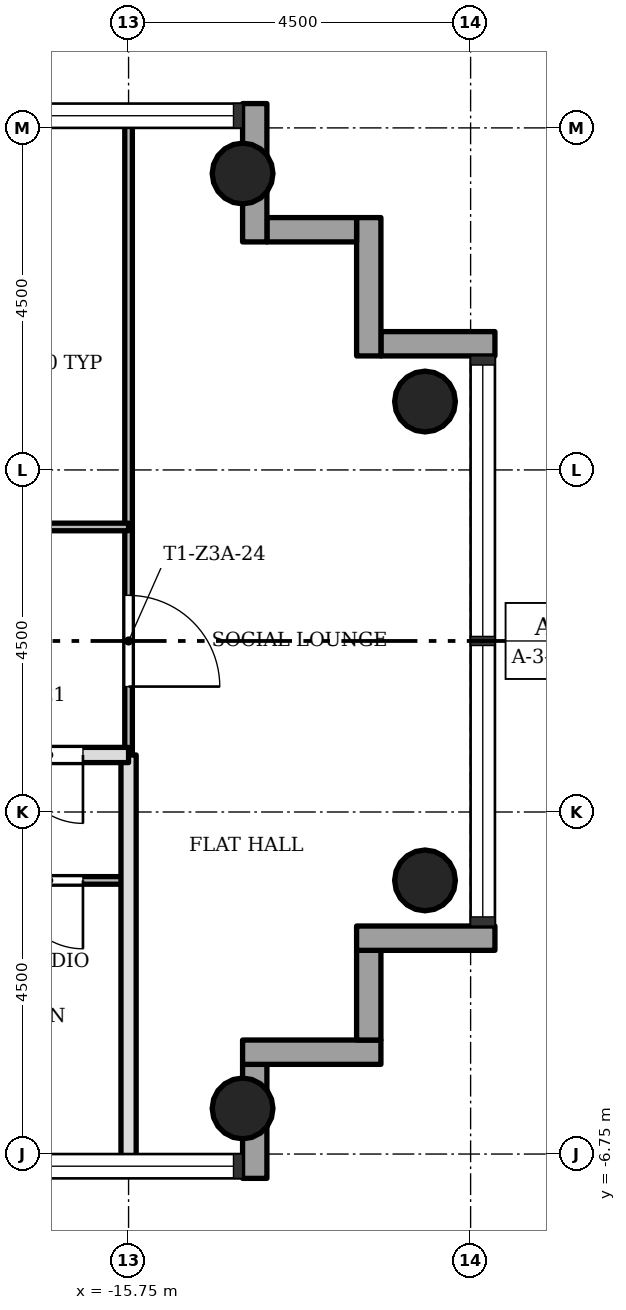
"""IFC4 building model, lengths in metres.
Left out: names, types, materials, properties, quantities, classifications, styles, units other than length and angle.
Written with IfcOpenShell. Run it as: python <this file> out.ifc"""

import sys

from ifc_helpers import new_model, si_unit, direction, frame, frame_2d, origin, origin_2d, place, context, subcontext, project, spatial, rectangle, hollow_circle, extrude, element, fill, save


model = new_model("IFC4")
c1 = context("Model", 3, precision=1e-05, world=origin(), true_north=direction((0.0, 1.0)))
c2 = subcontext(c1, "Body", "Model", "MODEL_VIEW")
j1 = project(units=[si_unit("LENGTHUNIT", "METRE"), si_unit("PLANEANGLEUNIT", "RADIAN")], contexts=[c1])
p1 = place(None, origin())
s1 = spatial("IfcSite", under=j1, at=p1, CompositionType="ELEMENT")
p2 = place(p1, origin())
s2 = spatial("IfcBuilding", under=s1, at=p2, CompositionType="ELEMENT")
p3 = place(p2, frame((0.0, 0.0, 140.5)))
s3 = spatial("IfcBuildingStorey", under=s2, at=p3, CompositionType="ELEMENT", Elevation=140.5)
for number, where, z_axis, x_axis in (
    (1, (-14.25, -6.15, 0.0), (0.0, 0.0, 1.0), (1.0, 0.0, 0.0)),
    (2, (-14.25, 6.15, 0.0), (0.0, 0.0, 1.0), (1.0, 0.0, 0.0)),
    (3, (-11.85, -3.15, 0.0), (0.0, 0.0, 1.0), (1.0, 0.0, 0.0)),
    (4, (-11.85, 3.15, 0.0), (0.0, 0.0, 1.0), (1.0, 0.0, 0.0)),
):
    element("IfcColumn", number, at=place(p3, frame(where, z_axis=z_axis, x_axis=x_axis)), inside=s3, PredefinedType="COLUMN", context=c2, shape_type="SweptSolid", body=[
        extrude(hollow_circle(Radius=0.4, WallThickness=0.028, at=origin_2d()), origin(), (0.0, 0.0, 1.0), 3.4),
    ])
p4 = place(p3, frame((-14.09, -7.07, -0.3), z_axis=(0.0, 0.0, 1.0), x_axis=(0.0, 1.0, 0.0)))
e5 = element("IfcWall", 5, at=p4, inside=s3, PredefinedType="STANDARD", context=c2, shape_type="SweptSolid", body=[
    extrude(rectangle(XDim=1.5, YDim=0.32, at=frame_2d((0.75, 0.0))), origin(), (0.0, 0.0, 1.0), 3.4),
])
p5 = place(p3, frame((-14.25, -5.41, -0.3), z_axis=(0.0, 0.0, 1.0), x_axis=(1.0, 0.0, 0.0)))
e6 = element("IfcWall", 6, at=p5, inside=s3, PredefinedType="STANDARD", context=c2, shape_type="SweptSolid", body=[
    extrude(rectangle(XDim=1.82, YDim=0.32, at=frame_2d((0.91, 0.0))), origin(), (0.0, 0.0, 1.0), 3.4),
])
p6 = place(p3, frame((-12.59, -5.25, -0.3), z_axis=(0.0, 0.0, 1.0), x_axis=(0.0, 1.0, 0.0)))
e7 = element("IfcWall", 7, at=p6, inside=s3, PredefinedType="STANDARD", context=c2, shape_type="SweptSolid", body=[
    extrude(rectangle(XDim=1.18, YDim=0.32, at=frame_2d((0.59, 0.0))), origin(), (0.0, 0.0, 1.0), 3.4),
])
p7 = place(p3, frame((-12.75, -3.91, -0.3), z_axis=(0.0, 0.0, 1.0), x_axis=(1.0, 0.0, 0.0)))
e8 = element("IfcWall", 8, at=p7, inside=s3, PredefinedType="STANDARD", context=c2, shape_type="SweptSolid", body=[
    extrude(rectangle(XDim=1.82, YDim=0.32, at=frame_2d((0.91, 0.0))), origin(), (0.0, 0.0, 1.0), 3.4),
])
p8 = place(p3, frame((-10.93, 3.91, -0.3), z_axis=(0.0, 0.0, 1.0), x_axis=(-1.0, 0.0, 0.0)))
e9 = element("IfcWall", 9, at=p8, inside=s3, PredefinedType="STANDARD", context=c2, shape_type="SweptSolid", body=[
    extrude(rectangle(XDim=1.5, YDim=0.32, at=frame_2d((0.75, 0.0))), origin(), (0.0, 0.0, 1.0), 3.4),
])
p9 = place(p3, frame((-12.59, 3.75, -0.3), z_axis=(0.0, 0.0, 1.0), x_axis=(0.0, 1.0, 0.0)))
e10 = element("IfcWall", 10, at=p9, inside=s3, PredefinedType="STANDARD", context=c2, shape_type="SweptSolid", body=[
    extrude(rectangle(XDim=1.82, YDim=0.32, at=frame_2d((0.91, 0.0))), origin(), (0.0, 0.0, 1.0), 3.4),
])
p10 = place(p3, frame((-12.75, 5.41, -0.3), z_axis=(0.0, 0.0, 1.0), x_axis=(-1.0, 0.0, 0.0)))
e11 = element("IfcWall", 11, at=p10, inside=s3, PredefinedType="STANDARD", context=c2, shape_type="SweptSolid", body=[
    extrude(rectangle(XDim=1.18, YDim=0.32, at=frame_2d((0.59, 0.0))), origin(), (0.0, 0.0, 1.0), 3.4),
])
p11 = place(p3, frame((-14.09, 5.25, -0.3), z_axis=(0.0, 0.0, 1.0), x_axis=(0.0, 1.0, 0.0)))
e12 = element("IfcWall", 12, at=p11, inside=s3, PredefinedType="STANDARD", context=c2, shape_type="SweptSolid", body=[
    extrude(rectangle(XDim=1.82, YDim=0.32, at=frame_2d((0.91, 0.0))), origin(), (0.0, 0.0, 1.0), 3.4),
])
p12 = place(p3, frame((-15.75, -1.5, 0.0), z_axis=(0.0, 0.0, 1.0), x_axis=(0.0, 1.0, 0.0)))
e13 = element("IfcWall", 13, at=p12, inside=s3, PredefinedType="PARTITIONING", context=c2, shape_type="SweptSolid", body=[
    extrude(rectangle(XDim=8.35, YDim=0.1, at=frame_2d((4.175, 0.0))), origin(), (0.0, 0.0, 1.0), 3.0),
])
p13 = place(p12, frame((0.9, 0.0, 0.0)))
e14 = element("IfcOpeningElement", 14, at=p13, cuts=e13, PredefinedType="OPENING", context=c2, shape_type="SweptSolid", body=[
    extrude(rectangle(XDim=1.2, YDim=2.1, at=frame_2d((0.6, 1.05))), frame((0.0, 0.06, 0.0), z_axis=(0.0, -1.0, 0.0), x_axis=(1.0, 0.0, 0.0)), (0.0, 0.0, 1.0), 0.12),
])
p14 = place(p3, frame((-15.75, -6.85, 0.0), z_axis=(0.0, 0.0, 1.0), x_axis=(0.0, 1.0, 0.0)))
e15 = element("IfcWall", 15, at=p14, inside=s3, PredefinedType="SOLIDWALL", context=c2, shape_type="SweptSolid", body=[
    extrude(rectangle(XDim=5.35, YDim=0.2, at=frame_2d((2.675, 0.0))), origin(), (0.0, 0.0, 1.0), 3.0),
])
p15 = place(p3, frame((-20.25, -3.15, 0.0), z_axis=(0.0, 0.0, 1.0), x_axis=(1.0, 0.0, 0.0)))
e16 = element("IfcWall", 16, at=p15, inside=s3, PredefinedType="PARTITIONING", context=c2, shape_type="SweptSolid", body=[
    extrude(rectangle(XDim=4.5, YDim=0.1, at=frame_2d((2.25, 0.0))), origin(), (0.0, 0.0, 1.0), 3.0),
])
p16 = place(p15, frame((3.0, 0.0, 0.0)))
e17 = element("IfcOpeningElement", 17, at=p16, cuts=e16, PredefinedType="OPENING", context=c2, shape_type="SweptSolid", body=[
    extrude(rectangle(XDim=0.9, YDim=2.1, at=frame_2d((0.45, 1.05))), frame((0.0, 0.06, 0.0), z_axis=(0.0, -1.0, 0.0), x_axis=(1.0, 0.0, 0.0)), (0.0, 0.0, 1.0), 0.12),
])
p17 = place(p3, frame((-20.25, -1.5, 0.0), z_axis=(0.0, 0.0, 1.0), x_axis=(1.0, 0.0, 0.0)))
e18 = element("IfcWall", 18, at=p17, inside=s3, PredefinedType="SOLIDWALL", context=c2, shape_type="SweptSolid", body=[
    extrude(rectangle(XDim=4.5, YDim=0.2, at=frame_2d((2.25, 0.0))), origin(), (0.0, 0.0, 1.0), 3.0),
])
p18 = place(p17, frame((3.0, 0.0, 0.0)))
e19 = element("IfcOpeningElement", 19, at=p18, cuts=e18, PredefinedType="OPENING", context=c2, shape_type="SweptSolid", body=[
    extrude(rectangle(XDim=0.9, YDim=2.1, at=frame_2d((0.45, 1.05))), frame((0.0, 0.11, 0.0), z_axis=(0.0, -1.0, 0.0), x_axis=(1.0, 0.0, 0.0)), (0.0, 0.0, 1.0), 0.22),
])
p19 = place(p3, frame((-20.25, 1.5, 0.0), z_axis=(0.0, 0.0, 1.0), x_axis=(1.0, 0.0, 0.0)))
e20 = element("IfcWall", 20, at=p19, inside=s3, PredefinedType="PARTITIONING", context=c2, shape_type="SweptSolid", body=[
    extrude(rectangle(XDim=4.5, YDim=0.1, at=frame_2d((2.25, 0.0))), origin(), (0.0, 0.0, 1.0), 3.0),
])
p20 = place(p19, frame((1.8, 0.0, 0.0)))
e21 = element("IfcOpeningElement", 21, at=p20, cuts=e20, PredefinedType="OPENING", context=c2, shape_type="SweptSolid", body=[
    extrude(rectangle(XDim=0.9, YDim=2.1, at=frame_2d((0.45, 1.05))), frame((0.0, 0.06, 0.0), z_axis=(0.0, -1.0, 0.0), x_axis=(1.0, 0.0, 0.0)), (0.0, 0.0, 1.0), 0.12),
])
p21 = place(p18, origin())
e22 = element("IfcDoor", 22, at=p21, inside=s3, OperationType="SINGLE_SWING_RIGHT", PredefinedType="DOOR", context=c2, shape_type="SweptSolid", body=[
    extrude(rectangle(XDim=0.9, YDim=2.1, at=frame_2d((0.45, 1.05))), frame((0.0, 0.025, 0.0), z_axis=(0.0, -1.0, 0.0), x_axis=(1.0, 0.0, 0.0)), (0.0, 0.0, 1.0), 0.05),
])
fill(e19, e22)
p22 = place(p16, origin())
e23 = element("IfcDoor", 23, at=p22, inside=s3, OperationType="SINGLE_SWING_RIGHT", PredefinedType="DOOR", context=c2, shape_type="SweptSolid", body=[
    extrude(rectangle(XDim=0.9, YDim=2.1, at=frame_2d((0.45, 1.05))), frame((0.0, 0.025, 0.0), z_axis=(0.0, -1.0, 0.0), x_axis=(1.0, 0.0, 0.0)), (0.0, 0.0, 1.0), 0.05),
])
fill(e17, e23)
p23 = place(p13, origin())
e24 = element("IfcDoor", 24, at=p23, inside=s3, OperationType="SINGLE_SWING_LEFT", PredefinedType="DOOR", context=c2, shape_type="SweptSolid", body=[
    extrude(rectangle(XDim=1.2, YDim=2.1, at=frame_2d((0.6, 1.05))), frame((0.0, 0.025, 0.0), z_axis=(0.0, -1.0, 0.0), x_axis=(1.0, 0.0, 0.0)), (0.0, 0.0, 1.0), 0.05),
])
fill(e14, e24)
save(model, sys.argv[1])
